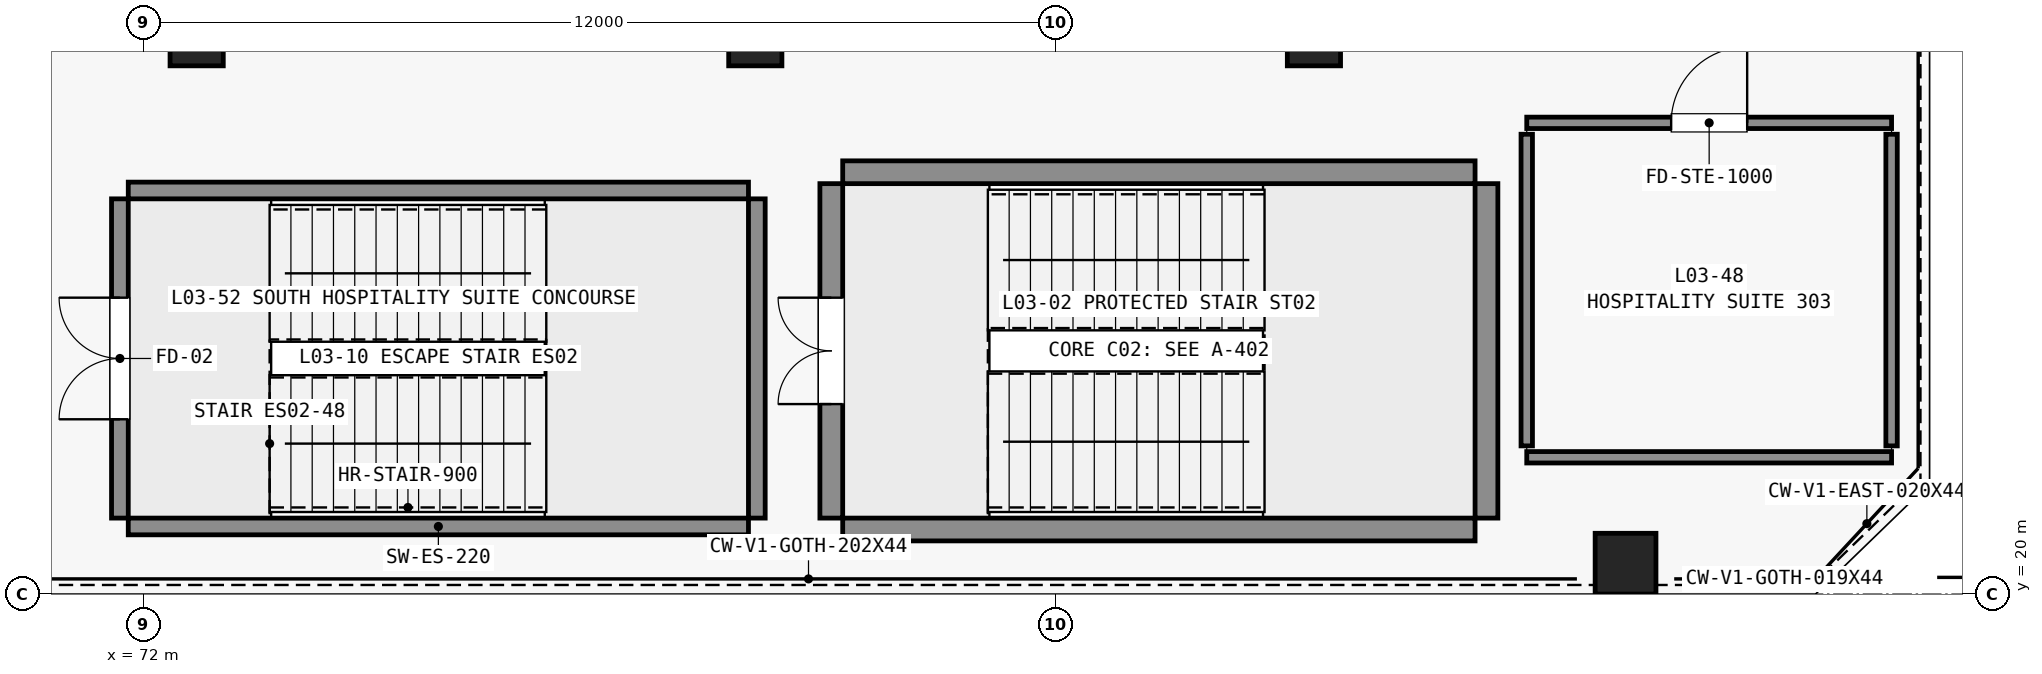
"""IFC4 building model, lengths in metres.
Left out: names, types, materials, properties, quantities, classifications, styles, units other than length and angle.
Written with IfcOpenShell. Run it as: python <this file> out.ifc"""

import sys

from ifc_helpers import new_model, si_unit, direction, frame, frame_2d, origin, origin_2d, place, context, subcontext, project, spatial, rectangle, extrude, element, fill, save


model = new_model("IFC4")
c1 = context("Model", 3, precision=1e-05, world=origin(), true_north=direction((0.0, 1.0)))
c2 = subcontext(c1, "Body", "Model", "MODEL_VIEW")
j1 = project(units=[si_unit("LENGTHUNIT", "METRE"), si_unit("PLANEANGLEUNIT", "RADIAN")], contexts=[c1])
p1 = place(None, origin())
s1 = spatial("IfcSite", under=j1, at=p1, CompositionType="ELEMENT")
p2 = place(p1, origin())
s2 = spatial("IfcBuilding", under=s1, at=p2, CompositionType="ELEMENT")
p3 = place(p2, frame((0.0, 0.0, 16.2)))
s3 = spatial("IfcBuildingStorey", under=s2, at=p3, CompositionType="ELEMENT", Elevation=16.2)
p4 = place(p3, frame((91.5, 20.4, 0.0), z_axis=(0.0, 0.0, 1.0), x_axis=(1.0, 0.0, 0.0)))
e1 = element("IfcColumn", 1, at=p4, inside=s3, PredefinedType="PILASTER", context=c2, shape_type="SweptSolid", body=[
    extrude(rectangle(XDim=0.8, YDim=0.8, at=origin_2d()), origin(), (0.0, 0.0, 1.0), 4.44),
])
for number, where, z_axis, x_axis in (
    (2, (81.2, 20.85, 0.0), (0.0, 0.0, 1.0), (1.0, 0.0, 0.0)),
    (3, (81.2, 25.55, 0.0), (0.0, 0.0, 1.0), (1.0, 0.0, 0.0)),
):
    element("IfcWall", number, at=place(p3, frame(where, z_axis=z_axis, x_axis=x_axis)), inside=s3, PredefinedType="SHEAR", context=c2, shape_type="SweptSolid", body=[
        extrude(rectangle(XDim=8.32, YDim=0.3, at=frame_2d((4.16, 0.0))), origin(), (0.0, 0.0, 1.0), 4.8),
    ])
p5 = place(p3, frame((81.05, 21.0, 0.0), z_axis=(0.0, 0.0, 1.0), x_axis=(0.0, 1.0, 0.0)))
e4 = element("IfcWall", 4, at=p5, inside=s3, PredefinedType="SHEAR", context=c2, shape_type="SweptSolid", body=[
    extrude(rectangle(XDim=4.4, YDim=0.3, at=frame_2d((2.2, 0.0))), origin(), (0.0, 0.0, 1.0), 4.8),
])
p6 = place(p5, frame((1.5, 0.0, 0.0)))
e5 = element("IfcOpeningElement", 5, at=p6, cuts=e4, PredefinedType="OPENING", context=c2, shape_type="SweptSolid", body=[
    extrude(rectangle(XDim=1.4, YDim=2.2, at=frame_2d((0.7, 1.1))), frame((0.0, 0.16, 0.0), z_axis=(0.0, -1.0, 0.0), x_axis=(1.0, 0.0, 0.0)), (0.0, 0.0, 1.0), 0.32),
])
p7 = place(p3, frame((89.67, 21.0, 0.0), z_axis=(0.0, 0.0, 1.0), x_axis=(0.0, 1.0, 0.0)))
e6 = element("IfcWall", 6, at=p7, inside=s3, PredefinedType="SHEAR", context=c2, shape_type="SweptSolid", body=[
    extrude(rectangle(XDim=4.4, YDim=0.3, at=frame_2d((2.2, 0.0))), origin(), (0.0, 0.0, 1.0), 4.8),
])
for number, where, z_axis, x_axis in (
    (7, (72.7, 27.3, 0.0), (0.0, 0.0, 1.0), (1.0, 0.0, 0.0)),
    (8, (80.05, 27.3, 0.0), (0.0, 0.0, 1.0), (1.0, 0.0, 0.0)),
    (9, (87.4, 27.3, 0.0), (0.0, 0.0, 1.0), (1.0, 0.0, 0.0)),
):
    element("IfcColumn", number, at=place(p3, frame(where, z_axis=z_axis, x_axis=x_axis)), inside=s3, PredefinedType="COLUMN", context=c2, shape_type="SweptSolid", body=[
        extrude(rectangle(XDim=0.7, YDim=0.7, at=origin_2d()), origin(), (0.0, 0.0, 1.0), 3.25),
    ])
for number, where, z_axis, x_axis in (
    (10, (71.8, 20.89, 0.0), (0.0, 0.0, 1.0), (1.0, 0.0, 0.0)),
    (11, (71.8, 25.31, 0.0), (0.0, 0.0, 1.0), (1.0, 0.0, 0.0)),
):
    element("IfcWall", number, at=place(p3, frame(where, z_axis=z_axis, x_axis=x_axis)), inside=s3, PredefinedType="SHEAR", context=c2, shape_type="SweptSolid", body=[
        extrude(rectangle(XDim=8.16, YDim=0.22, at=frame_2d((4.08, 0.0))), origin(), (0.0, 0.0, 1.0), 4.8),
    ])
p8 = place(p3, frame((71.69, 21.0, 0.0), z_axis=(0.0, 0.0, 1.0), x_axis=(0.0, 1.0, 0.0)))
e12 = element("IfcWall", 12, at=p8, inside=s3, PredefinedType="SHEAR", context=c2, shape_type="SweptSolid", body=[
    extrude(rectangle(XDim=4.2, YDim=0.22, at=frame_2d((2.1, 0.0))), origin(), (0.0, 0.0, 1.0), 4.8),
])
p9 = place(p8, frame((1.3, 0.0, 0.0)))
e13 = element("IfcOpeningElement", 13, at=p9, cuts=e12, PredefinedType="OPENING", context=c2, shape_type="SweptSolid", body=[
    extrude(rectangle(XDim=1.6, YDim=2.2, at=frame_2d((0.8, 1.1))), frame((0.0, 0.12, 0.0), z_axis=(0.0, -1.0, 0.0), x_axis=(1.0, 0.0, 0.0)), (0.0, 0.0, 1.0), 0.24),
])
p10 = place(p3, frame((80.07, 21.0, 0.0), z_axis=(0.0, 0.0, 1.0), x_axis=(0.0, 1.0, 0.0)))
e14 = element("IfcWall", 14, at=p10, inside=s3, PredefinedType="SHEAR", context=c2, shape_type="SweptSolid", body=[
    extrude(rectangle(XDim=4.2, YDim=0.22, at=frame_2d((2.1, 0.0))), origin(), (0.0, 0.0, 1.0), 4.8),
])
p11 = place(p3, frame((90.2, 21.8, 0.0), z_axis=(0.0, 0.0, 1.0), x_axis=(1.0, 0.0, 0.0)))
e15 = element("IfcWall", 15, at=p11, inside=s3, PredefinedType="STANDARD", context=c2, shape_type="SweptSolid", body=[
    extrude(rectangle(XDim=4.8, YDim=0.15, at=frame_2d((2.4, 0.0))), origin(), (0.0, 0.0, 1.0), 4.44),
])
p12 = place(p3, frame((90.2, 26.2, 0.0), z_axis=(0.0, 0.0, 1.0), x_axis=(1.0, 0.0, 0.0)))
e16 = element("IfcWall", 16, at=p12, inside=s3, PredefinedType="STANDARD", context=c2, shape_type="SweptSolid", body=[
    extrude(rectangle(XDim=4.8, YDim=0.15, at=frame_2d((2.4, 0.0))), origin(), (0.0, 0.0, 1.0), 4.44),
])
p13 = place(p12, frame((1.9, 0.0, 0.0)))
e17 = element("IfcOpeningElement", 17, at=p13, cuts=e16, PredefinedType="OPENING", context=c2, shape_type="SweptSolid", body=[
    extrude(rectangle(XDim=1.0, YDim=2.15, at=frame_2d((0.5, 1.075))), frame((0.0, 0.085, 0.0), z_axis=(0.0, -1.0, 0.0), x_axis=(1.0, 0.0, 0.0)), (0.0, 0.0, 1.0), 0.17),
])
for number, where, z_axis, x_axis in (
    (18, (90.2, 21.95, 0.0), (0.0, 0.0, 1.0), (0.0, 1.0, 0.0)),
    (19, (95.0, 21.95, 0.0), (0.0, 0.0, 1.0), (0.0, 1.0, 0.0)),
):
    element("IfcWall", number, at=place(p3, frame(where, z_axis=z_axis, x_axis=x_axis)), inside=s3, PredefinedType="STANDARD", context=c2, shape_type="SweptSolid", body=[
        extrude(rectangle(XDim=4.1, YDim=0.15, at=frame_2d((2.05, 0.0))), origin(), (0.0, 0.0, 1.0), 4.44),
    ])
p14 = place(p6, origin())
e20 = element("IfcDoor", 20, at=p14, inside=s3, OperationType="DOUBLE_DOOR_SINGLE_SWING", PredefinedType="DOOR", context=c2, shape_type="SweptSolid", body=[
    extrude(rectangle(XDim=1.4, YDim=2.2, at=frame_2d((0.7, 1.1))), frame((0.0, 0.025, 0.0), z_axis=(0.0, -1.0, 0.0), x_axis=(1.0, 0.0, 0.0)), (0.0, 0.0, 1.0), 0.05),
])
fill(e5, e20)
p15 = place(p9, origin())
e21 = element("IfcDoor", 21, at=p15, inside=s3, OperationType="DOUBLE_DOOR_SINGLE_SWING", PredefinedType="DOOR", context=c2, shape_type="SweptSolid", body=[
    extrude(rectangle(XDim=1.6, YDim=2.2, at=frame_2d((0.8, 1.1))), frame((0.0, 0.025, 0.0), z_axis=(0.0, -1.0, 0.0), x_axis=(1.0, 0.0, 0.0)), (0.0, 0.0, 1.0), 0.05),
])
fill(e13, e21)
p16 = place(p13, origin())
e22 = element("IfcDoor", 22, at=p16, inside=s3, OperationType="SINGLE_SWING_RIGHT", PredefinedType="DOOR", context=c2, shape_type="SweptSolid", body=[
    extrude(rectangle(XDim=1.0, YDim=2.15, at=frame_2d((0.5, 1.075))), frame((0.0, 0.025, 0.0), z_axis=(0.0, -1.0, 0.0), x_axis=(1.0, 0.0, 0.0)), (0.0, 0.0, 1.0), 0.05),
])
fill(e17, e22)
save(model, sys.argv[1])
